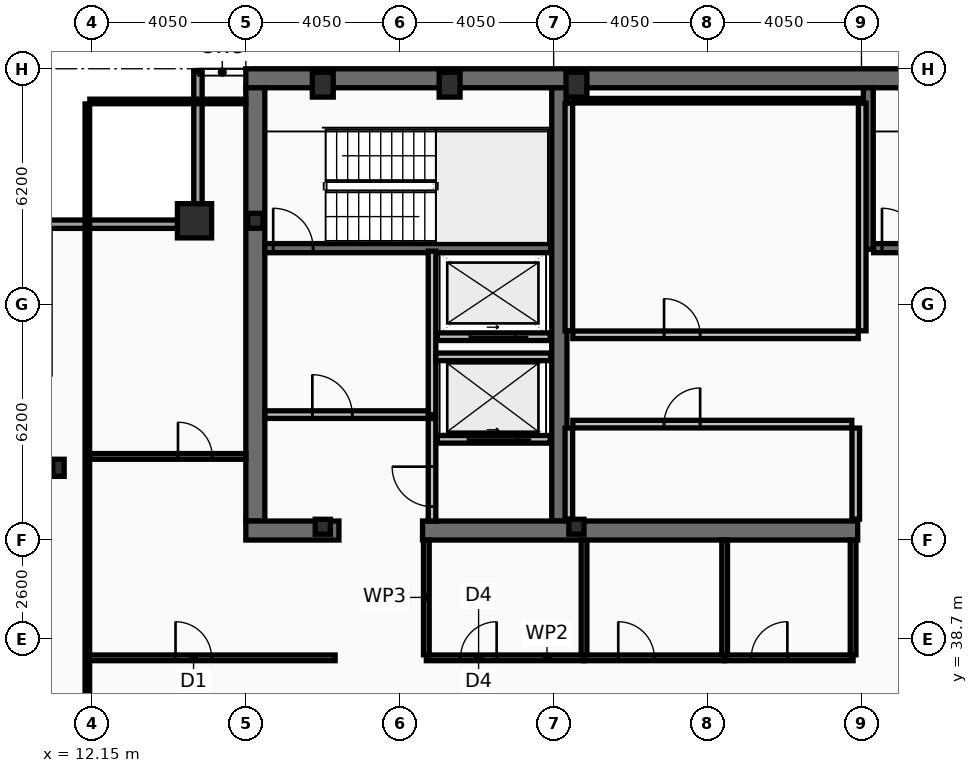
"""IFC4 building model, lengths in metres.
Left out: names, types, materials, properties, quantities, classifications, styles, units other than length and angle.
Written with IfcOpenShell. Run it as: python <this file> out.ifc"""

import sys

from ifc_helpers import new_model, si_unit, direction, frame, frame_2d, origin, origin_2d, place, context, subcontext, project, spatial, rectangle, hollow_rectangle, i_section, extrude, element, fill, save


model = new_model("IFC4")
c1 = context("Model", 3, precision=1e-05, world=origin(), true_north=direction((0.0, 1.0)))
c2 = subcontext(c1, "Body", "Model", "MODEL_VIEW")
j1 = project(units=[si_unit("LENGTHUNIT", "METRE"), si_unit("PLANEANGLEUNIT", "RADIAN")], contexts=[c1])
p1 = place(None, origin())
s1 = spatial("IfcSite", under=j1, at=p1, CompositionType="ELEMENT")
p2 = place(p1, origin())
s2 = spatial("IfcBuilding", under=s1, at=p2, CompositionType="ELEMENT")
p3 = place(p2, frame((0.0, 0.0, 321.8)))
s3 = spatial("IfcBuildingStorey", under=s2, at=p3, CompositionType="ELEMENT", Elevation=321.8)
p4 = place(p3, frame((16.2, 53.45, 0.0), z_axis=(0.0, 0.0, 1.0), x_axis=(1.0, 0.0, 0.0)))
e1 = element("IfcWall", 1, at=p4, inside=s3, PredefinedType="SHEAR", context=c2, shape_type="SweptSolid", body=[
    extrude(rectangle(XDim=40.5, YDim=0.5, at=frame_2d((20.25, 0.0))), origin(), (0.0, 0.0, 1.0), 3.44),
])
p5 = place(p3, frame((16.45, 41.8, 0.0), z_axis=(0.0, 0.0, 1.0), x_axis=(0.0, 1.0, 0.0)))
e2 = element("IfcWall", 2, at=p5, inside=s3, PredefinedType="SHEAR", context=c2, shape_type="SweptSolid", body=[
    extrude(rectangle(XDim=11.4, YDim=0.5, at=frame_2d((5.7, 0.0))), origin(), (0.0, 0.0, 1.0), 3.44),
])
p6 = place(p3, frame((24.45, 41.8, 0.0), z_axis=(0.0, 0.0, 1.0), x_axis=(0.0, 1.0, 0.0)))
e3 = element("IfcWall", 3, at=p6, inside=s3, PredefinedType="SHEAR", context=c2, shape_type="SweptSolid", body=[
    extrude(rectangle(XDim=11.4, YDim=0.4, at=frame_2d((5.7, 0.0))), origin(), (0.0, 0.0, 1.0), 3.44),
])
p7 = place(p3, frame((18.65, 41.55, 0.0), z_axis=(0.0, 0.0, 1.0), x_axis=(-1.0, 0.0, 0.0)))
e4 = element("IfcWall", 4, at=p7, inside=s3, PredefinedType="SHEAR", context=c2, shape_type="SweptSolid", body=[
    extrude(rectangle(XDim=2.45, YDim=0.5, at=frame_2d((1.225, 0.0))), origin(), (0.0, 0.0, 1.0), 3.44),
])
p8 = place(p3, frame((32.3, 41.55, 0.0), z_axis=(0.0, 0.0, 1.0), x_axis=(-1.0, 0.0, 0.0)))
e5 = element("IfcWall", 5, at=p8, inside=s3, PredefinedType="SHEAR", context=c2, shape_type="SweptSolid", body=[
    extrude(rectangle(XDim=11.45, YDim=0.5, at=frame_2d((5.725, 0.0))), origin(), (0.0, 0.0, 1.0), 3.44),
])
p9 = place(p3, frame((32.58, 48.95, 0.0), z_axis=(0.0, 0.0, 1.0), x_axis=(0.0, 1.0, 0.0)))
e6 = element("IfcWall", 6, at=p9, inside=s3, PredefinedType="SHEAR", context=c2, shape_type="SweptSolid", body=[
    extrude(rectangle(XDim=4.25, YDim=0.26, at=frame_2d((2.125, 0.0))), origin(), (0.0, 0.0, 1.0), 3.44),
])
p10 = place(p3, frame((16.7, 48.98, 0.0), z_axis=(0.0, 0.0, 1.0), x_axis=(1.0, 0.0, 0.0)))
e7 = element("IfcWall", 7, at=p10, inside=s3, PredefinedType="SHEAR", context=c2, shape_type="SweptSolid", body=[
    extrude(rectangle(XDim=7.52, YDim=0.24, at=frame_2d((3.76, 0.0))), origin(), (0.0, 0.0, 1.0), 3.44),
])
p11 = place(p10, frame((0.22, 0.0, 0.0)))
e8 = element("IfcOpeningElement", 8, at=p11, cuts=e7, PredefinedType="OPENING", context=c2, shape_type="SweptSolid", body=[
    extrude(rectangle(XDim=1.05, YDim=2.15, at=frame_2d((0.525, 1.075))), frame((0.0, 0.13, 0.0), z_axis=(0.0, -1.0, 0.0), x_axis=(1.0, 0.0, 0.0)), (0.0, 0.0, 1.0), 0.26),
])
p12 = place(p3, frame((32.72, 48.98, 0.0), z_axis=(0.0, 0.0, 1.0), x_axis=(1.0, 0.0, 0.0)))
e9 = element("IfcWall", 9, at=p12, inside=s3, PredefinedType="SHEAR", context=c2, shape_type="SweptSolid", body=[
    extrude(rectangle(XDim=7.56, YDim=0.24, at=frame_2d((3.78, 0.0))), origin(), (0.0, 0.0, 1.0), 3.44),
])
p13 = place(p12, frame((0.22, 0.0, 0.0)))
e10 = element("IfcOpeningElement", 10, at=p13, cuts=e9, PredefinedType="OPENING", context=c2, shape_type="SweptSolid", body=[
    extrude(rectangle(XDim=1.05, YDim=2.15, at=frame_2d((0.525, 1.075))), frame((0.0, 0.13, 0.0), z_axis=(0.0, -1.0, 0.0), x_axis=(1.0, 0.0, 0.0)), (0.0, 0.0, 1.0), 0.26),
])
p14 = place(p3, frame((14.85, 49.7, 0.0), z_axis=(0.0, 0.0, 1.0), x_axis=(1.0, 0.0, 0.0)))
e11 = element("IfcColumn", 11, at=p14, inside=s3, PredefinedType="COLUMN", context=c2, shape_type="SweptSolid", body=[
    extrude(hollow_rectangle(XDim=0.9, YDim=0.9, WallThickness=0.05, at=origin_2d()), origin(), (0.0, 0.0, 1.0), 3.6),
])
for number, where, z_axis, x_axis in (
    (12, (18.225, 53.28, 0.0), (0.0, 0.0, 1.0), (1.0, 0.0, 0.0)),
    (13, (21.562, 53.28, 0.0), (0.0, 0.0, 1.0), (1.0, 0.0, 0.0)),
    (14, (24.9, 53.28, 0.0), (0.0, 0.0, 1.0), (1.0, 0.0, 0.0)),
):
    element("IfcColumn", number, at=place(p3, frame(where, z_axis=z_axis, x_axis=x_axis)), inside=s3, PredefinedType="COLUMN", context=c2, shape_type="SweptSolid", body=[
        extrude(hollow_rectangle(XDim=0.55, YDim=0.65, WallThickness=0.04, at=origin_2d()), origin(), (0.0, 0.0, 1.0), 3.6),
    ])
p15 = place(p3, frame((11.27, 43.2, 0.0), z_axis=(0.0, 0.0, 1.0), x_axis=(1.0, 0.0, 0.0)))
e15 = element("IfcColumn", 15, at=p15, inside=s3, PredefinedType="COLUMN", context=c2, shape_type="SweptSolid", body=[
    extrude(i_section(OverallWidth=0.3, OverallDepth=0.45, WebThickness=0.014, FlangeThickness=0.026, at=origin_2d()), origin(), (0.0, 0.0, 1.0), 3.6),
])
for number, where, z_axis, x_axis in (
    (16, (16.45, 49.7, 0.0), (0.0, 0.0, 1.0), (1.0, 0.0, 0.0)),
    (17, (18.225, 41.65, 0.0), (0.0, 0.0, 1.0), (1.0, 0.0, 0.0)),
    (18, (24.9, 41.65, 0.0), (0.0, 0.0, 1.0), (1.0, 0.0, 0.0)),
):
    element("IfcColumn", number, at=place(p3, frame(where, z_axis=z_axis, x_axis=x_axis)), inside=s3, PredefinedType="COLUMN", context=c2, shape_type="SweptSolid", body=[
        extrude(i_section(OverallWidth=0.399, OverallDepth=0.393, WebThickness=0.023, FlangeThickness=0.037, at=origin_2d()), origin(), (0.0, 0.0, 1.0), 3.6),
    ])
p16 = place(p3, frame((10.83, 49.61, 0.0), z_axis=(0.0, 0.0, 1.0), x_axis=(1.0, 0.0, 0.0)))
e19 = element("IfcWall", 19, at=p16, inside=s3, PredefinedType="SOLIDWALL", context=c2, shape_type="SweptSolid", body=[
    extrude(rectangle(XDim=4.22, YDim=0.22, at=frame_2d((2.11, 0.0))), origin(), (0.0, 0.0, 1.0), 2.88),
])
p17 = place(p3, frame((14.94, 49.72, 0.0), z_axis=(0.0, 0.0, 1.0), x_axis=(0.0, 1.0, 0.0)))
e20 = element("IfcWall", 20, at=p17, inside=s3, PredefinedType="SOLIDWALL", context=c2, shape_type="SweptSolid", body=[
    extrude(rectangle(XDim=3.91, YDim=0.22, at=frame_2d((1.955, 0.0))), origin(), (0.0, 0.0, 1.0), 2.88),
])
p18 = place(p3, frame((24.21, 43.95, 0.0), z_axis=(0.0, 0.0, 1.0), x_axis=(-1.0, 0.0, 0.0)))
e21 = element("IfcWall", 21, at=p18, inside=s3, PredefinedType="PARTITIONING", context=c2, shape_type="SweptSolid", body=[
    extrude(rectangle(XDim=2.97, YDim=0.2, at=frame_2d((1.485, 0.0))), origin(), (0.0, 0.0, 1.0), 3.44),
])
p19 = place(p18, frame((0.86, 0.0, 0.0)))
e22 = element("IfcOpeningElement", 22, at=p19, cuts=e21, PredefinedType="OPENING", context=c2, shape_type="SweptSolid", body=[
    extrude(rectangle(XDim=1.3, YDim=2.18, at=frame_2d((0.65, 1.09))), frame((0.0, 0.11, 0.0), z_axis=(0.0, -1.0, 0.0), x_axis=(1.0, 0.0, 0.0)), (0.0, 0.0, 1.0), 0.22),
])
p20 = place(p3, frame((24.21, 46.65, 0.0), z_axis=(0.0, 0.0, 1.0), x_axis=(-1.0, 0.0, 0.0)))
e23 = element("IfcWall", 23, at=p20, inside=s3, PredefinedType="PARTITIONING", context=c2, shape_type="SweptSolid", body=[
    extrude(rectangle(XDim=2.97, YDim=0.2, at=frame_2d((1.485, 0.0))), origin(), (0.0, 0.0, 1.0), 3.44),
])
p21 = place(p20, frame((0.91, 0.0, 0.0)))
e24 = element("IfcOpeningElement", 24, at=p21, cuts=e23, PredefinedType="OPENING", context=c2, shape_type="SweptSolid", body=[
    extrude(rectangle(XDim=1.2, YDim=2.18, at=frame_2d((0.6, 1.09))), frame((0.0, 0.11, 0.0), z_axis=(0.0, -1.0, 0.0), x_axis=(1.0, 0.0, 0.0)), (0.0, 0.0, 1.0), 0.22),
])
p22 = place(p3, frame((21.1, 44.6, 0.0), z_axis=(0.0, 0.0, 1.0), x_axis=(0.0, 1.0, 0.0)))
e25 = element("IfcWall", 25, at=p22, inside=s3, PredefinedType="PARTITIONING", context=c2, shape_type="SweptSolid", body=[
    extrude(rectangle(XDim=4.3, YDim=0.2, at=frame_2d((2.15, 0.0))), origin(), (0.0, 0.0, 1.0), 3.44),
])
p23 = place(p3, frame((16.7, 44.6, 0.0), z_axis=(0.0, 0.0, 1.0), x_axis=(1.0, 0.0, 0.0)))
e26 = element("IfcWall", 26, at=p23, inside=s3, PredefinedType="PARTITIONING", context=c2, shape_type="SweptSolid", body=[
    extrude(rectangle(XDim=4.3, YDim=0.2, at=frame_2d((2.15, 0.0))), origin(), (0.0, 0.0, 1.0), 3.44),
])
p24 = place(p23, frame((1.25, 0.0, 0.0)))
e27 = element("IfcOpeningElement", 27, at=p24, cuts=e26, PredefinedType="OPENING", context=c2, shape_type="SweptSolid", body=[
    extrude(rectangle(XDim=1.05, YDim=2.15, at=frame_2d((0.525, 1.075))), frame((0.0, 0.11, 0.0), z_axis=(0.0, -1.0, 0.0), x_axis=(1.0, 0.0, 0.0)), (0.0, 0.0, 1.0), 0.22),
])
p25 = place(p3, frame((21.2, 46.12, 0.0), z_axis=(0.0, 0.0, 1.0), x_axis=(1.0, 0.0, 0.0)))
e28 = element("IfcWall", 28, at=p25, inside=s3, PredefinedType="PARTITIONING", context=c2, shape_type="SweptSolid", body=[
    extrude(rectangle(XDim=3.02, YDim=0.2, at=frame_2d((1.51, 0.0))), origin(), (0.0, 0.0, 1.0), 3.44),
])
p26 = place(p3, frame((21.1, 41.8, 0.0), z_axis=(0.0, 0.0, 1.0), x_axis=(0.0, 1.0, 0.0)))
e29 = element("IfcWall", 29, at=p26, inside=s3, PredefinedType="PARTITIONING", context=c2, shape_type="SweptSolid", body=[
    extrude(rectangle(XDim=2.695, YDim=0.2, at=frame_2d((1.348, 0.0))), origin(), (0.0, 0.0, 1.0), 3.44),
])
p27 = place(p26, frame((0.38, 0.0, 0.0)))
e30 = element("IfcOpeningElement", 30, at=p27, cuts=e29, PredefinedType="OPENING", context=c2, shape_type="SweptSolid", body=[
    extrude(rectangle(XDim=1.05, YDim=2.15, at=frame_2d((0.525, 1.075))), frame((0.0, 0.11, 0.0), z_axis=(0.0, -1.0, 0.0), x_axis=(1.0, 0.0, 0.0)), (0.0, 0.0, 1.0), 0.22),
])
for number, where, z_axis, x_axis in (
    (31, (24.7, 46.805, 0.0), (0.0, 0.0, 1.0), (0.0, 1.0, 0.0)),
    (32, (32.42, 46.805, 0.0), (0.0, 0.0, 1.0), (0.0, 1.0, 0.0)),
):
    element("IfcWall", number, at=place(p3, frame(where, z_axis=z_axis, x_axis=x_axis)), inside=s3, PredefinedType="PARTITIONING", context=c2, shape_type="SweptSolid", body=[
        extrude(rectangle(XDim=5.99, YDim=0.2, at=frame_2d((2.995, 0.0))), origin(), (0.0, 0.0, 1.0), 3.44),
    ])
p28 = place(p3, frame((24.805, 52.86, 0.0), z_axis=(0.0, 0.0, 1.0), x_axis=(1.0, 0.0, 0.0)))
e33 = element("IfcWall", 33, at=p28, inside=s3, PredefinedType="PARTITIONING", context=c2, shape_type="SweptSolid", body=[
    extrude(rectangle(XDim=7.51, YDim=0.12, at=frame_2d((3.755, 0.0))), origin(), (0.0, 0.0, 1.0), 3.44),
])
p29 = place(p3, frame((24.805, 46.7, 0.0), z_axis=(0.0, 0.0, 1.0), x_axis=(1.0, 0.0, 0.0)))
e34 = element("IfcWall", 34, at=p29, inside=s3, PredefinedType="PARTITIONING", context=c2, shape_type="SweptSolid", body=[
    extrude(rectangle(XDim=7.51, YDim=0.2, at=frame_2d((3.755, 0.0))), origin(), (0.0, 0.0, 1.0), 3.44),
])
p30 = place(p29, frame((2.4, 0.0, 0.0)))
e35 = element("IfcOpeningElement", 35, at=p30, cuts=e34, PredefinedType="OPENING", context=c2, shape_type="SweptSolid", body=[
    extrude(rectangle(XDim=0.95, YDim=2.1, at=frame_2d((0.475, 1.05))), frame((0.0, 0.11, 0.0), z_axis=(0.0, -1.0, 0.0), x_axis=(1.0, 0.0, 0.0)), (0.0, 0.0, 1.0), 0.22),
])
for number, where, z_axis, x_axis in (
    (36, (24.7, 41.85, 0.0), (0.0, 0.0, 1.0), (0.0, 1.0, 0.0)),
    (37, (32.25, 41.85, 0.0), (0.0, 0.0, 1.0), (0.0, 1.0, 0.0)),
):
    element("IfcWall", number, at=place(p3, frame(where, z_axis=z_axis, x_axis=x_axis)), inside=s3, PredefinedType="PARTITIONING", context=c2, shape_type="SweptSolid", body=[
        extrude(rectangle(XDim=2.395, YDim=0.2, at=frame_2d((1.198, 0.0))), origin(), (0.0, 0.0, 1.0), 3.44),
    ])
p31 = place(p3, frame((24.805, 44.35, 0.0), z_axis=(0.0, 0.0, 1.0), x_axis=(1.0, 0.0, 0.0)))
e38 = element("IfcWall", 38, at=p31, inside=s3, PredefinedType="PARTITIONING", context=c2, shape_type="SweptSolid", body=[
    extrude(rectangle(XDim=7.34, YDim=0.2, at=frame_2d((3.67, 0.0))), origin(), (0.0, 0.0, 1.0), 3.44),
])
p32 = place(p31, frame((2.4, 0.0, 0.0)))
e39 = element("IfcOpeningElement", 39, at=p32, cuts=e38, PredefinedType="OPENING", context=c2, shape_type="SweptSolid", body=[
    extrude(rectangle(XDim=0.95, YDim=2.1, at=frame_2d((0.475, 1.05))), frame((0.0, 0.11, 0.0), z_axis=(0.0, -1.0, 0.0), x_axis=(1.0, 0.0, 0.0)), (0.0, 0.0, 1.0), 0.22),
])
p33 = place(p3, frame((20.95, 38.2, 0.0), z_axis=(0.0, 0.0, 1.0), x_axis=(1.0, 0.0, 0.0)))
e40 = element("IfcWall", 40, at=p33, inside=s3, PredefinedType="PARTITIONING", context=c2, shape_type="SweptSolid", body=[
    extrude(rectangle(XDim=4.15, YDim=0.15, at=frame_2d((2.075, 0.0))), origin(), (0.0, 0.0, 1.0), 2.83),
])
p34 = place(p33, frame((0.9, 0.0, 0.0)))
e41 = element("IfcOpeningElement", 41, at=p34, cuts=e40, PredefinedType="OPENING", context=c2, shape_type="SweptSolid", body=[
    extrude(rectangle(XDim=0.95, YDim=2.05, at=frame_2d((0.475, 1.025))), frame((0.0, 0.085, 0.0), z_axis=(0.0, -1.0, 0.0), x_axis=(1.0, 0.0, 0.0)), (0.0, 0.0, 1.0), 0.17),
])
p35 = place(p3, frame((25.1, 38.2, 0.0), z_axis=(0.0, 0.0, 1.0), x_axis=(1.0, 0.0, 0.0)))
e42 = element("IfcWall", 42, at=p35, inside=s3, PredefinedType="PARTITIONING", context=c2, shape_type="SweptSolid", body=[
    extrude(rectangle(XDim=3.7, YDim=0.15, at=frame_2d((1.85, 0.0))), origin(), (0.0, 0.0, 1.0), 2.83),
])
p36 = place(p35, frame((0.9, 0.0, 0.0)))
e43 = element("IfcOpeningElement", 43, at=p36, cuts=e42, PredefinedType="OPENING", context=c2, shape_type="SweptSolid", body=[
    extrude(rectangle(XDim=0.95, YDim=2.05, at=frame_2d((0.475, 1.025))), frame((0.0, 0.085, 0.0), z_axis=(0.0, -1.0, 0.0), x_axis=(1.0, 0.0, 0.0)), (0.0, 0.0, 1.0), 0.17),
])
p37 = place(p3, frame((28.8, 38.2, 0.0), z_axis=(0.0, 0.0, 1.0), x_axis=(1.0, 0.0, 0.0)))
e44 = element("IfcWall", 44, at=p37, inside=s3, PredefinedType="PARTITIONING", context=c2, shape_type="SweptSolid", body=[
    extrude(rectangle(XDim=3.38, YDim=0.15, at=frame_2d((1.69, 0.0))), origin(), (0.0, 0.0, 1.0), 3.44),
])
p38 = place(p37, frame((0.7, 0.0, 0.0)))
e45 = element("IfcOpeningElement", 45, at=p38, cuts=e44, PredefinedType="OPENING", context=c2, shape_type="SweptSolid", body=[
    extrude(rectangle(XDim=0.95, YDim=2.05, at=frame_2d((0.475, 1.025))), frame((0.0, 0.085, 0.0), z_axis=(0.0, -1.0, 0.0), x_axis=(1.0, 0.0, 0.0)), (0.0, 0.0, 1.0), 0.17),
])
p39 = place(p3, frame((20.95, 38.28, 0.0), z_axis=(0.0, 0.0, 1.0), x_axis=(0.0, 1.0, 0.0)))
e46 = element("IfcWall", 46, at=p39, inside=s3, PredefinedType="PARTITIONING", context=c2, shape_type="SweptSolid", body=[
    extrude(rectangle(XDim=3.02, YDim=0.15, at=frame_2d((1.51, 0.0))), origin(), (0.0, 0.0, 1.0), 3.44),
])
p40 = place(p3, frame((25.1, 38.28, 0.0), z_axis=(0.0, 0.0, 1.0), x_axis=(0.0, 1.0, 0.0)))
e47 = element("IfcWall", 47, at=p40, inside=s3, PredefinedType="PARTITIONING", context=c2, shape_type="SweptSolid", body=[
    extrude(rectangle(XDim=3.02, YDim=0.15, at=frame_2d((1.51, 0.0))), origin(), (0.0, 0.0, 1.0), 2.83),
])
for number, where, z_axis, x_axis in (
    (48, (28.8, 38.28, 0.0), (0.0, 0.0, 1.0), (0.0, 1.0, 0.0)),
    (49, (32.18, 38.28, 0.0), (0.0, 0.0, 1.0), (0.0, 1.0, 0.0)),
):
    element("IfcWall", number, at=place(p3, frame(where, z_axis=z_axis, x_axis=x_axis)), inside=s3, PredefinedType="PARTITIONING", context=c2, shape_type="SweptSolid", body=[
        extrude(rectangle(XDim=3.02, YDim=0.15, at=frame_2d((1.51, 0.0))), origin(), (0.0, 0.0, 1.0), 3.44),
    ])
p41 = place(p3, frame((12.03, 38.2, 0.0), z_axis=(0.0, 0.0, 1.0), x_axis=(1.0, 0.0, 0.0)))
e50 = element("IfcWall", 50, at=p41, inside=s3, PredefinedType="PARTITIONING", context=c2, shape_type="SweptSolid", body=[
    extrude(rectangle(XDim=6.52, YDim=0.15, at=frame_2d((3.26, 0.0))), origin(), (0.0, 0.0, 1.0), 2.83),
])
p42 = place(p41, frame((2.32, 0.0, 0.0)))
e51 = element("IfcOpeningElement", 51, at=p42, cuts=e50, PredefinedType="OPENING", context=c2, shape_type="SweptSolid", body=[
    extrude(rectangle(XDim=0.95, YDim=2.05, at=frame_2d((0.475, 1.025))), frame((0.0, 0.085, 0.0), z_axis=(0.0, -1.0, 0.0), x_axis=(1.0, 0.0, 0.0)), (0.0, 0.0, 1.0), 0.17),
])
p43 = place(p3, frame((12.095, 43.5, 0.0), z_axis=(0.0, 0.0, 1.0), x_axis=(1.0, 0.0, 0.0)))
e52 = element("IfcWall", 52, at=p43, inside=s3, PredefinedType="PARTITIONING", context=c2, shape_type="SweptSolid", body=[
    extrude(rectangle(XDim=4.105, YDim=0.15, at=frame_2d((2.052, 0.0))), origin(), (0.0, 0.0, 1.0), 2.83),
])
p44 = place(p43, frame((2.32, 0.0, 0.0)))
e53 = element("IfcOpeningElement", 53, at=p44, cuts=e52, PredefinedType="OPENING", context=c2, shape_type="SweptSolid", body=[
    extrude(rectangle(XDim=0.9, YDim=2.05, at=frame_2d((0.45, 1.025))), frame((0.0, 0.085, 0.0), z_axis=(0.0, -1.0, 0.0), x_axis=(1.0, 0.0, 0.0)), (0.0, 0.0, 1.0), 0.17),
])
p45 = place(p3, frame((12.03, 10.665, 0.0), z_axis=(0.0, 0.0, 1.0), x_axis=(0.0, 1.0, 0.0)))
e54 = element("IfcWall", 54, at=p45, inside=s3, PredefinedType="PARTITIONING", context=c2, shape_type="SweptSolid", body=[
    extrude(rectangle(XDim=42.11, YDim=0.12, at=frame_2d((21.055, 0.0))), origin(), (0.0, 0.0, 1.0), 2.83),
])
p46 = place(p3, frame((12.095, 52.84, 0.0), z_axis=(0.0, 0.0, 1.0), x_axis=(1.0, 0.0, 0.0)))
e55 = element("IfcWall", 55, at=p46, inside=s3, PredefinedType="PARTITIONING", context=c2, shape_type="SweptSolid", body=[
    extrude(rectangle(XDim=4.105, YDim=0.12, at=frame_2d((2.052, 0.0))), origin(), (0.0, 0.0, 1.0), 3.44),
])
p47 = place(p11, origin())
e56 = element("IfcDoor", 56, at=p47, inside=s3, OperationType="SINGLE_SWING_LEFT", PredefinedType="DOOR", context=c2, shape_type="SweptSolid", body=[
    extrude(rectangle(XDim=1.05, YDim=2.15, at=frame_2d((0.525, 1.075))), frame((0.0, 0.025, 0.0), z_axis=(0.0, -1.0, 0.0), x_axis=(1.0, 0.0, 0.0)), (0.0, 0.0, 1.0), 0.05),
])
fill(e8, e56)
p48 = place(p13, origin())
e57 = element("IfcDoor", 57, at=p48, inside=s3, OperationType="SINGLE_SWING_LEFT", PredefinedType="DOOR", context=c2, shape_type="SweptSolid", body=[
    extrude(rectangle(XDim=1.05, YDim=2.15, at=frame_2d((0.525, 1.075))), frame((0.0, 0.025, 0.0), z_axis=(0.0, -1.0, 0.0), x_axis=(1.0, 0.0, 0.0)), (0.0, 0.0, 1.0), 0.05),
])
fill(e10, e57)
p49 = place(p19, origin())
e58 = element("IfcDoor", 58, at=p49, inside=s3, OperationType="SLIDING_TO_LEFT", PredefinedType="DOOR", context=c2, shape_type="SweptSolid", body=[
    extrude(rectangle(XDim=1.3, YDim=2.18, at=frame_2d((0.65, 1.09))), frame((0.0, 0.025, 0.0), z_axis=(0.0, -1.0, 0.0), x_axis=(1.0, 0.0, 0.0)), (0.0, 0.0, 1.0), 0.05),
])
fill(e22, e58)
p50 = place(p21, origin())
e59 = element("IfcDoor", 59, at=p50, inside=s3, OperationType="SLIDING_TO_LEFT", PredefinedType="DOOR", context=c2, shape_type="SweptSolid", body=[
    extrude(rectangle(XDim=1.2, YDim=2.18, at=frame_2d((0.6, 1.09))), frame((0.0, 0.025, 0.0), z_axis=(0.0, -1.0, 0.0), x_axis=(1.0, 0.0, 0.0)), (0.0, 0.0, 1.0), 0.05),
])
fill(e24, e59)
p51 = place(p24, origin())
e60 = element("IfcDoor", 60, at=p51, inside=s3, OperationType="SINGLE_SWING_LEFT", PredefinedType="DOOR", context=c2, shape_type="SweptSolid", body=[
    extrude(rectangle(XDim=1.05, YDim=2.15, at=frame_2d((0.525, 1.075))), frame((0.0, 0.025, 0.0), z_axis=(0.0, -1.0, 0.0), x_axis=(1.0, 0.0, 0.0)), (0.0, 0.0, 1.0), 0.05),
])
fill(e27, e60)
p52 = place(p27, origin())
e61 = element("IfcDoor", 61, at=p52, inside=s3, OperationType="SINGLE_SWING_RIGHT", PredefinedType="DOOR", context=c2, shape_type="SweptSolid", body=[
    extrude(rectangle(XDim=1.05, YDim=2.15, at=frame_2d((0.525, 1.075))), frame((0.0, 0.025, 0.0), z_axis=(0.0, -1.0, 0.0), x_axis=(1.0, 0.0, 0.0)), (0.0, 0.0, 1.0), 0.05),
])
fill(e30, e61)
p53 = place(p30, origin())
e62 = element("IfcDoor", 62, at=p53, inside=s3, OperationType="SINGLE_SWING_LEFT", PredefinedType="DOOR", context=c2, shape_type="SweptSolid", body=[
    extrude(rectangle(XDim=0.95, YDim=2.1, at=frame_2d((0.475, 1.05))), frame((0.0, 0.025, 0.0), z_axis=(0.0, -1.0, 0.0), x_axis=(1.0, 0.0, 0.0)), (0.0, 0.0, 1.0), 0.05),
])
fill(e35, e62)
p54 = place(p32, origin())
e63 = element("IfcDoor", 63, at=p54, inside=s3, OperationType="SINGLE_SWING_RIGHT", PredefinedType="DOOR", context=c2, shape_type="SweptSolid", body=[
    extrude(rectangle(XDim=0.95, YDim=2.1, at=frame_2d((0.475, 1.05))), frame((0.0, 0.025, 0.0), z_axis=(0.0, -1.0, 0.0), x_axis=(1.0, 0.0, 0.0)), (0.0, 0.0, 1.0), 0.05),
])
fill(e39, e63)
p55 = place(p34, origin())
e64 = element("IfcDoor", 64, at=p55, inside=s3, OperationType="SINGLE_SWING_RIGHT", PredefinedType="DOOR", context=c2, shape_type="SweptSolid", body=[
    extrude(rectangle(XDim=0.95, YDim=2.05, at=frame_2d((0.475, 1.025))), frame((0.0, 0.025, 0.0), z_axis=(0.0, -1.0, 0.0), x_axis=(1.0, 0.0, 0.0)), (0.0, 0.0, 1.0), 0.05),
])
fill(e41, e64)
p56 = place(p36, origin())
e65 = element("IfcDoor", 65, at=p56, inside=s3, OperationType="SINGLE_SWING_LEFT", PredefinedType="DOOR", context=c2, shape_type="SweptSolid", body=[
    extrude(rectangle(XDim=0.95, YDim=2.05, at=frame_2d((0.475, 1.025))), frame((0.0, 0.025, 0.0), z_axis=(0.0, -1.0, 0.0), x_axis=(1.0, 0.0, 0.0)), (0.0, 0.0, 1.0), 0.05),
])
fill(e43, e65)
p57 = place(p38, origin())
e66 = element("IfcDoor", 66, at=p57, inside=s3, OperationType="SINGLE_SWING_RIGHT", PredefinedType="DOOR", context=c2, shape_type="SweptSolid", body=[
    extrude(rectangle(XDim=0.95, YDim=2.05, at=frame_2d((0.475, 1.025))), frame((0.0, 0.025, 0.0), z_axis=(0.0, -1.0, 0.0), x_axis=(1.0, 0.0, 0.0)), (0.0, 0.0, 1.0), 0.05),
])
fill(e45, e66)
p58 = place(p42, origin())
e67 = element("IfcDoor", 67, at=p58, inside=s3, OperationType="SINGLE_SWING_LEFT", PredefinedType="DOOR", context=c2, shape_type="SweptSolid", body=[
    extrude(rectangle(XDim=0.95, YDim=2.05, at=frame_2d((0.475, 1.025))), frame((0.0, 0.025, 0.0), z_axis=(0.0, -1.0, 0.0), x_axis=(1.0, 0.0, 0.0)), (0.0, 0.0, 1.0), 0.05),
])
fill(e51, e67)
p59 = place(p44, origin())
e68 = element("IfcDoor", 68, at=p59, inside=s3, OperationType="SINGLE_SWING_LEFT", PredefinedType="DOOR", context=c2, shape_type="SweptSolid", body=[
    extrude(rectangle(XDim=0.9, YDim=2.05, at=frame_2d((0.45, 1.025))), frame((0.0, 0.025, 0.0), z_axis=(0.0, -1.0, 0.0), x_axis=(1.0, 0.0, 0.0)), (0.0, 0.0, 1.0), 0.05),
])
fill(e53, e68)
save(model, sys.argv[1])
